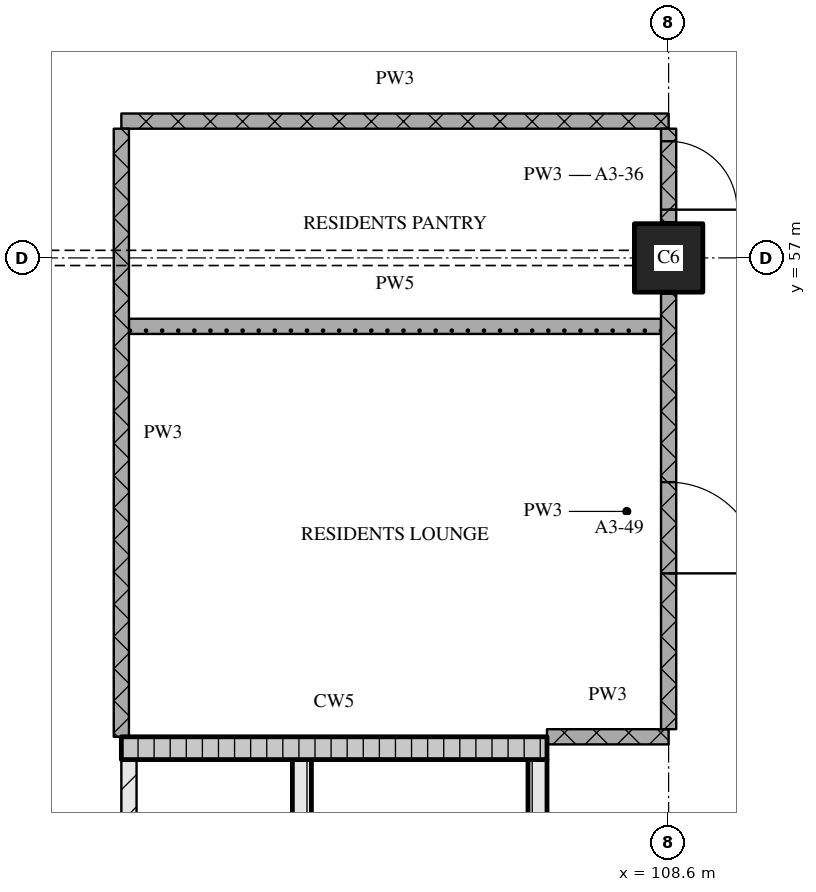
"""IFC4 building model, lengths in metres.
Left out: names, types, materials, properties, quantities, classifications, styles, units other than length and angle.
Written with IfcOpenShell. Run it as: python <this file> out.ifc"""

import sys

from ifc_helpers import new_model, si_unit, direction, frame, frame_2d, origin, origin_2d, place, context, subcontext, project, spatial, rectangle, extrude, element, fill, save


model = new_model("IFC4")
c1 = context("Model", 3, precision=1e-05, world=origin(), true_north=direction((0.0, 1.0)))
c2 = subcontext(c1, "Body", "Model", "MODEL_VIEW")
j1 = project(units=[si_unit("LENGTHUNIT", "METRE"), si_unit("PLANEANGLEUNIT", "RADIAN")], contexts=[c1])
p1 = place(None, origin())
s1 = spatial("IfcSite", under=j1, at=p1, CompositionType="ELEMENT")
p2 = place(p1, origin())
s2 = spatial("IfcBuilding", under=s1, at=p2, CompositionType="ELEMENT")
p3 = place(p2, frame((0.0, 0.0, 62.4)))
s3 = spatial("IfcBuildingStorey", under=s2, at=p3, CompositionType="ELEMENT", Elevation=62.4)
p4 = place(p3, frame((108.6, 57.0, 0.0), z_axis=(0.0, 0.0, 1.0), x_axis=(1.0, 0.0, 0.0)))
e1 = element("IfcColumn", 1, at=p4, inside=s3, PredefinedType="COLUMN", context=c2, shape_type="SweptSolid", body=[
    extrude(rectangle(XDim=0.9, YDim=0.9, at=origin_2d()), origin(), (0.0, 0.0, 1.0), 3.6),
])
p5 = place(p3, frame((101.5, 43.5, 0.0), z_axis=(0.0, 0.0, 1.0), x_axis=(0.0, 1.0, 0.0)))
e2 = element("IfcWall", 2, at=p5, inside=s3, PredefinedType="PARTITIONING", context=c2, shape_type="SweptSolid", body=[
    extrude(rectangle(XDim=6.9, YDim=0.2, at=frame_2d((3.45, 0.0))), origin(), (0.0, 0.0, 1.0), 3.32),
])
p6 = place(p5, frame((1.0, 0.0, 0.0)))
e3 = element("IfcOpeningElement", 3, at=p6, cuts=e2, PredefinedType="OPENING", context=c2, shape_type="SweptSolid", body=[
    extrude(rectangle(XDim=1.0, YDim=2.1, at=frame_2d((0.5, 1.05))), frame((0.0, 0.11, 0.0), z_axis=(0.0, -1.0, 0.0), x_axis=(1.0, 0.0, 0.0)), (0.0, 0.0, 1.0), 0.22),
])
p7 = place(p3, frame((103.775, 43.5, 0.0), z_axis=(0.0, 0.0, 1.0), x_axis=(0.0, 1.0, 0.0)))
e4 = element("IfcWall", 4, at=p7, inside=s3, PredefinedType="SOLIDWALL", context=c2, shape_type="SweptSolid", body=[
    extrude(rectangle(XDim=6.9, YDim=0.25, at=frame_2d((3.45, 0.0))), origin(), (0.0, 0.0, 1.0), 3.32),
])
p8 = place(p7, frame((0.2, 0.0, 0.0)))
e5 = element("IfcOpeningElement", 5, at=p8, cuts=e4, PredefinedType="OPENING", context=c2, shape_type="SweptSolid", body=[
    extrude(rectangle(XDim=1.0, YDim=2.1, at=frame_2d((0.5, 1.05))), frame((0.0, 0.135, 0.0), z_axis=(0.0, -1.0, 0.0), x_axis=(1.0, 0.0, 0.0)), (0.0, 0.0, 1.0), 0.27),
])
p9 = place(p3, frame((106.875, 43.5, 0.0), z_axis=(0.0, 0.0, 1.0), x_axis=(0.0, 1.0, 0.0)))
e6 = element("IfcWall", 6, at=p9, inside=s3, PredefinedType="SOLIDWALL", context=c2, shape_type="SweptSolid", body=[
    extrude(rectangle(XDim=6.9, YDim=0.25, at=frame_2d((3.45, 0.0))), origin(), (0.0, 0.0, 1.0), 3.32),
])
p10 = place(p3, frame((101.4, 50.55, 0.0), z_axis=(0.0, 0.0, 1.0), x_axis=(1.0, 0.0, 0.0)))
e7 = element("IfcWall", 7, at=p10, inside=s3, PredefinedType="SOLIDWALL", context=c2, shape_type="SweptSolid", body=[
    extrude(rectangle(XDim=5.6, YDim=0.3, at=frame_2d((2.8, 0.0))), origin(), (0.0, 0.0, 1.0), 3.32),
])
p11 = place(p3, frame((107.0, 50.7, 0.0), z_axis=(0.0, 0.0, 1.0), x_axis=(1.0, 0.0, 0.0)))
e8 = element("IfcWall", 8, at=p11, inside=s3, PredefinedType="PARTITIONING", context=c2, shape_type="SweptSolid", body=[
    extrude(rectangle(XDim=1.6, YDim=0.2, at=frame_2d((0.8, 0.0))), origin(), (0.0, 0.0, 1.0), 3.32),
])
p12 = place(p3, frame((101.5, 56.1, 0.0), z_axis=(0.0, 0.0, 1.0), x_axis=(1.0, 0.0, 0.0)))
e9 = element("IfcWall", 9, at=p12, inside=s3, PredefinedType="PARTITIONING", context=c2, shape_type="SweptSolid", body=[
    extrude(rectangle(XDim=7.0, YDim=0.2, at=frame_2d((3.5, 0.0))), origin(), (0.0, 0.0, 1.0), 3.32),
])
p13 = place(p3, frame((101.4, 58.8, 0.0), z_axis=(0.0, 0.0, 1.0), x_axis=(1.0, 0.0, 0.0)))
e10 = element("IfcWall", 10, at=p13, inside=s3, PredefinedType="PARTITIONING", context=c2, shape_type="SweptSolid", body=[
    extrude(rectangle(XDim=7.2, YDim=0.2, at=frame_2d((3.6, 0.0))), origin(), (0.0, 0.0, 1.0), 3.32),
])
p14 = place(p3, frame((101.4, 58.7, 0.0), z_axis=(0.0, 0.0, 1.0), x_axis=(0.0, -1.0, 0.0)))
e11 = element("IfcWall", 11, at=p14, inside=s3, PredefinedType="PARTITIONING", context=c2, shape_type="SweptSolid", body=[
    extrude(rectangle(XDim=8.0, YDim=0.2, at=frame_2d((4.0, 0.0))), origin(), (0.0, 0.0, 1.0), 3.32),
])
p15 = place(p3, frame((108.6, 50.8, 0.0), z_axis=(0.0, 0.0, 1.0), x_axis=(0.0, 1.0, 0.0)))
e12 = element("IfcWall", 12, at=p15, inside=s3, PredefinedType="PARTITIONING", context=c2, shape_type="SweptSolid", body=[
    extrude(rectangle(XDim=5.73, YDim=0.2, at=frame_2d((2.865, 0.0))), origin(), (0.0, 0.0, 1.0), 3.32),
])
p16 = place(p15, frame((2.05, 0.0, 0.0)))
e13 = element("IfcOpeningElement", 13, at=p16, cuts=e12, PredefinedType="OPENING", context=c2, shape_type="SweptSolid", body=[
    extrude(rectangle(XDim=1.2, YDim=2.1, at=frame_2d((0.6, 1.05))), frame((0.0, 0.11, 0.0), z_axis=(0.0, -1.0, 0.0), x_axis=(1.0, 0.0, 0.0)), (0.0, 0.0, 1.0), 0.22),
])
p17 = place(p3, frame((108.6, 57.47, 0.0), z_axis=(0.0, 0.0, 1.0), x_axis=(0.0, 1.0, 0.0)))
e14 = element("IfcWall", 14, at=p17, inside=s3, PredefinedType="PARTITIONING", context=c2, shape_type="SweptSolid", body=[
    extrude(rectangle(XDim=1.23, YDim=0.2, at=frame_2d((0.615, 0.0))), origin(), (0.0, 0.0, 1.0), 3.32),
])
p18 = place(p17, frame((0.165, 0.0, 0.0)))
e15 = element("IfcOpeningElement", 15, at=p18, cuts=e14, PredefinedType="OPENING", context=c2, shape_type="SweptSolid", body=[
    extrude(rectangle(XDim=0.9, YDim=2.1, at=frame_2d((0.45, 1.05))), frame((0.0, 0.11, 0.0), z_axis=(0.0, -1.0, 0.0), x_axis=(1.0, 0.0, 0.0)), (0.0, 0.0, 1.0), 0.22),
])
p19 = place(p16, origin())
e16 = element("IfcDoor", 16, at=p19, inside=s3, OperationType="SINGLE_SWING_RIGHT", PredefinedType="DOOR", context=c2, shape_type="SweptSolid", body=[
    extrude(rectangle(XDim=1.2, YDim=2.1, at=frame_2d((0.6, 1.05))), frame((0.0, 0.025, 0.0), z_axis=(0.0, -1.0, 0.0), x_axis=(1.0, 0.0, 0.0)), (0.0, 0.0, 1.0), 0.05),
])
fill(e13, e16)
p20 = place(p18, origin())
e17 = element("IfcDoor", 17, at=p20, inside=s3, OperationType="SINGLE_SWING_RIGHT", PredefinedType="DOOR", context=c2, shape_type="SweptSolid", body=[
    extrude(rectangle(XDim=0.9, YDim=2.1, at=frame_2d((0.45, 1.05))), frame((0.0, 0.025, 0.0), z_axis=(0.0, -1.0, 0.0), x_axis=(1.0, 0.0, 0.0)), (0.0, 0.0, 1.0), 0.05),
])
fill(e15, e17)
save(model, sys.argv[1])
